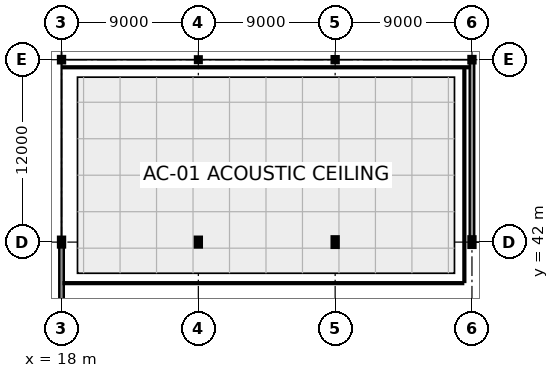
"""IFC4 building model, lengths in metres.
Left out: names, types, materials, properties, quantities, classifications, styles, units other than length and angle.
Written with IfcOpenShell. Run it as: python <this file> out.ifc"""

import sys

from ifc_helpers import new_model, si_unit, direction, frame, frame_2d, origin, origin_2d, place, context, subcontext, project, spatial, rectangle, i_section, extrude, element, fill, save


model = new_model("IFC4")
c1 = context("Model", 3, precision=1e-05, world=origin(), true_north=direction((0.0, 1.0)))
c2 = subcontext(c1, "Body", "Model", "MODEL_VIEW")
j1 = project(units=[si_unit("LENGTHUNIT", "METRE"), si_unit("PLANEANGLEUNIT", "RADIAN")], contexts=[c1])
p1 = place(None, origin())
s1 = spatial("IfcSite", under=j1, at=p1, CompositionType="ELEMENT")
p2 = place(p1, origin())
s2 = spatial("IfcBuilding", under=s1, at=p2, CompositionType="ELEMENT")
p3 = place(p2, frame((0.0, 0.0, 5.4)))
s3 = spatial("IfcBuildingStorey", under=s2, at=p3, CompositionType="ELEMENT", Elevation=5.4)
p4 = place(p3, frame((18.0, 42.0, 0.0), z_axis=(0.0, 0.0, 1.0), x_axis=(1.0, 0.0, 0.0)))
e1 = element("IfcColumn", 1, at=p4, inside=s3, PredefinedType="COLUMN", context=c2, shape_type="SweptSolid", body=[
    extrude(i_section(OverallWidth=0.3, OverallDepth=0.55, WebThickness=0.015, FlangeThickness=0.029, at=origin_2d()), origin(), (0.0, 0.0, 1.0), 4.5),
])
p5 = place(p3, frame((18.0, 54.0, 0.0), z_axis=(0.0, 0.0, 1.0), x_axis=(1.0, 0.0, 0.0)))
e2 = element("IfcColumn", 2, at=p5, inside=s3, PredefinedType="COLUMN", context=c2, shape_type="SweptSolid", body=[
    extrude(i_section(OverallWidth=0.3, OverallDepth=0.32, WebThickness=0.011, FlangeThickness=0.021, at=origin_2d()), origin(), (0.0, 0.0, 1.0), 4.5),
])
p6 = place(p3, frame((27.0, 42.0, 0.0), z_axis=(0.0, 0.0, 1.0), x_axis=(0.0, 1.0, 0.0)))
e3 = element("IfcColumn", 3, at=p6, inside=s3, PredefinedType="COLUMN", context=c2, shape_type="SweptSolid", body=[
    extrude(i_section(OverallWidth=0.3, OverallDepth=0.55, WebThickness=0.015, FlangeThickness=0.029, at=origin_2d()), origin(), (0.0, 0.0, 1.0), 4.5),
])
p7 = place(p3, frame((27.0, 54.0, 0.0), z_axis=(0.0, 0.0, 1.0), x_axis=(1.0, 0.0, 0.0)))
e4 = element("IfcColumn", 4, at=p7, inside=s3, PredefinedType="COLUMN", context=c2, shape_type="SweptSolid", body=[
    extrude(i_section(OverallWidth=0.28, OverallDepth=0.28, WebThickness=0.01, FlangeThickness=0.018, at=origin_2d()), origin(), (0.0, 0.0, 1.0), 4.5),
])
p8 = place(p3, frame((36.0, 42.0, 0.0), z_axis=(0.0, 0.0, 1.0), x_axis=(1.0, 0.0, 0.0)))
e5 = element("IfcColumn", 5, at=p8, inside=s3, PredefinedType="COLUMN", context=c2, shape_type="SweptSolid", body=[
    extrude(i_section(OverallWidth=0.3, OverallDepth=0.6, WebThickness=0.015, FlangeThickness=0.03, at=origin_2d()), origin(), (0.0, 0.0, 1.0), 4.5),
])
p9 = place(p3, frame((36.0, 54.0, 0.0), z_axis=(0.0, 0.0, 1.0), x_axis=(1.0, 0.0, 0.0)))
e6 = element("IfcColumn", 6, at=p9, inside=s3, PredefinedType="COLUMN", context=c2, shape_type="SweptSolid", body=[
    extrude(i_section(OverallWidth=0.3, OverallDepth=0.3, WebThickness=0.011, FlangeThickness=0.019, at=origin_2d()), origin(), (0.0, 0.0, 1.0), 4.5),
])
p10 = place(p3, frame((45.0, 42.0, 0.0), z_axis=(0.0, 0.0, 1.0), x_axis=(1.0, 0.0, 0.0)))
e7 = element("IfcColumn", 7, at=p10, inside=s3, PredefinedType="COLUMN", context=c2, shape_type="SweptSolid", body=[
    extrude(i_section(OverallWidth=0.3, OverallDepth=0.6, WebThickness=0.015, FlangeThickness=0.03, at=origin_2d()), origin(), (0.0, 0.0, 1.0), 4.5),
])
p11 = place(p3, frame((45.0, 54.0, 0.0), z_axis=(0.0, 0.0, 1.0), x_axis=(1.0, 0.0, 0.0)))
e8 = element("IfcColumn", 8, at=p11, inside=s3, PredefinedType="COLUMN", context=c2, shape_type="SweptSolid", body=[
    extrude(i_section(OverallWidth=0.3, OverallDepth=0.32, WebThickness=0.011, FlangeThickness=0.021, at=origin_2d()), origin(), (0.0, 0.0, 1.0), 4.5),
])
p12 = place(p3, frame((45.0, 42.298, 0.0), z_axis=(0.0, 0.0, 1.0), x_axis=(0.0, 1.0, 0.0)))
e9 = element("IfcWall", 9, at=p12, inside=s3, PredefinedType="SOLIDWALL", context=c2, shape_type="SweptSolid", body=[
    extrude(rectangle(XDim=11.544, YDim=0.3, at=frame_2d((5.772, 0.0))), origin(), (0.0, 0.0, 1.0), 3.765),
])
p13 = place(p12, frame((2.332, 0.0, 0.85)))
e10 = element("IfcOpeningElement", 10, at=p13, cuts=e9, PredefinedType="OPENING", context=c2, shape_type="SweptSolid", body=[
    extrude(rectangle(XDim=1.8, YDim=1.2, at=frame_2d((0.9, 0.6))), frame((0.0, 0.165, 0.0), z_axis=(0.0, -1.0, 0.0), x_axis=(1.0, 0.0, 0.0)), (0.0, 0.0, 1.0), 0.33),
])
p14 = place(p12, frame((7.412, 0.0, 0.85)))
e11 = element("IfcOpeningElement", 11, at=p14, cuts=e9, PredefinedType="OPENING", context=c2, shape_type="SweptSolid", body=[
    extrude(rectangle(XDim=1.8, YDim=1.2, at=frame_2d((0.9, 0.6))), frame((0.0, 0.165, 0.0), z_axis=(0.0, -1.0, 0.0), x_axis=(1.0, 0.0, 0.0)), (0.0, 0.0, 1.0), 0.33),
])
p15 = place(p3, frame((18.0, 41.727, 0.0), z_axis=(0.0, 0.0, 1.0), x_axis=(0.0, -1.0, 0.0)))
e12 = element("IfcWall", 12, at=p15, inside=s3, PredefinedType="SOLIDWALL", context=c2, shape_type="SweptSolid", body=[
    extrude(rectangle(XDim=17.767, YDim=0.3, at=frame_2d((8.884, 0.0))), origin(), (0.0, 0.0, 1.0), 4.18),
])
p16 = place(p15, frame((9.677, 0.0, 0.0)))
e13 = element("IfcOpeningElement", 13, at=p16, cuts=e12, PredefinedType="OPENING", context=c2, shape_type="SweptSolid", body=[
    extrude(rectangle(XDim=1.1, YDim=2.2, at=frame_2d((0.55, 1.1))), frame((0.0, 0.165, 0.0), z_axis=(0.0, -1.0, 0.0), x_axis=(1.0, 0.0, 0.0)), (0.0, 0.0, 1.0), 0.33),
])
p17 = place(p3, frame((18.075, 53.5, 0.0), z_axis=(0.0, 0.0, 1.0), x_axis=(1.0, 0.0, 0.0)))
e14 = element("IfcWall", 14, at=p17, inside=s3, PredefinedType="PARTITIONING", context=c2, shape_type="SweptSolid", body=[
    extrude(rectangle(XDim=26.78, YDim=0.12, at=frame_2d((13.39, 0.0))), origin(), (0.0, 0.0, 1.0), 4.14),
])
p18 = place(p3, frame((44.5, 53.445, 0.0), z_axis=(0.0, 0.0, 1.0), x_axis=(0.0, -1.0, 0.0)))
e15 = element("IfcWall", 15, at=p18, inside=s3, PredefinedType="PARTITIONING", context=c2, shape_type="SweptSolid", body=[
    extrude(rectangle(XDim=14.065, YDim=0.12, at=frame_2d((7.033, 0.0))), origin(), (0.0, 0.0, 1.0), 4.14),
])
p19 = place(p3, frame((44.42, 39.3, 0.0), z_axis=(0.0, 0.0, 1.0), x_axis=(-1.0, 0.0, 0.0)))
e16 = element("IfcWall", 16, at=p19, inside=s3, PredefinedType="PARTITIONING", context=c2, shape_type="SweptSolid", body=[
    extrude(rectangle(XDim=26.275, YDim=0.12, at=frame_2d((13.137, 0.0))), origin(), (0.0, 0.0, 1.0), 4.14),
])
p20 = place(p19, frame((12.663, 0.0, 0.0)))
e17 = element("IfcOpeningElement", 17, at=p20, cuts=e16, PredefinedType="OPENING", context=c2, shape_type="SweptSolid", body=[
    extrude(rectangle(XDim=0.95, YDim=2.15, at=frame_2d((0.475, 1.075))), frame((0.0, 0.075, 0.0), z_axis=(0.0, -1.0, 0.0), x_axis=(1.0, 0.0, 0.0)), (0.0, 0.0, 1.0), 0.15),
])
p21 = place(p13, origin())
e18 = element("IfcWindow", 18, at=p21, inside=s3, PartitioningType="SINGLE_PANEL", PredefinedType="WINDOW", context=c2, shape_type="SweptSolid", body=[
    extrude(rectangle(XDim=1.8, YDim=1.2, at=frame_2d((0.9, 0.6))), frame((0.0, 0.03, 0.0), z_axis=(0.0, -1.0, 0.0), x_axis=(1.0, 0.0, 0.0)), (0.0, 0.0, 1.0), 0.06),
])
fill(e10, e18)
p22 = place(p14, origin())
e19 = element("IfcWindow", 19, at=p22, inside=s3, PartitioningType="SINGLE_PANEL", PredefinedType="WINDOW", context=c2, shape_type="SweptSolid", body=[
    extrude(rectangle(XDim=1.8, YDim=1.2, at=frame_2d((0.9, 0.6))), frame((0.0, 0.03, 0.0), z_axis=(0.0, -1.0, 0.0), x_axis=(1.0, 0.0, 0.0)), (0.0, 0.0, 1.0), 0.06),
])
fill(e11, e19)
p23 = place(p20, frame((0.95, 0.0, 0.0), z_axis=(0.0, 0.0, 1.0), x_axis=(-1.0, 0.0, 0.0)))
e20 = element("IfcDoor", 20, at=p23, inside=s3, OperationType="SINGLE_SWING_RIGHT", PredefinedType="DOOR", context=c2, shape_type="SweptSolid", body=[
    extrude(rectangle(XDim=0.95, YDim=2.15, at=frame_2d((0.475, 1.075))), frame((0.0, 0.025, 0.0), z_axis=(0.0, -1.0, 0.0), x_axis=(1.0, 0.0, 0.0)), (0.0, 0.0, 1.0), 0.05),
])
fill(e17, e20)
save(model, sys.argv[1])
